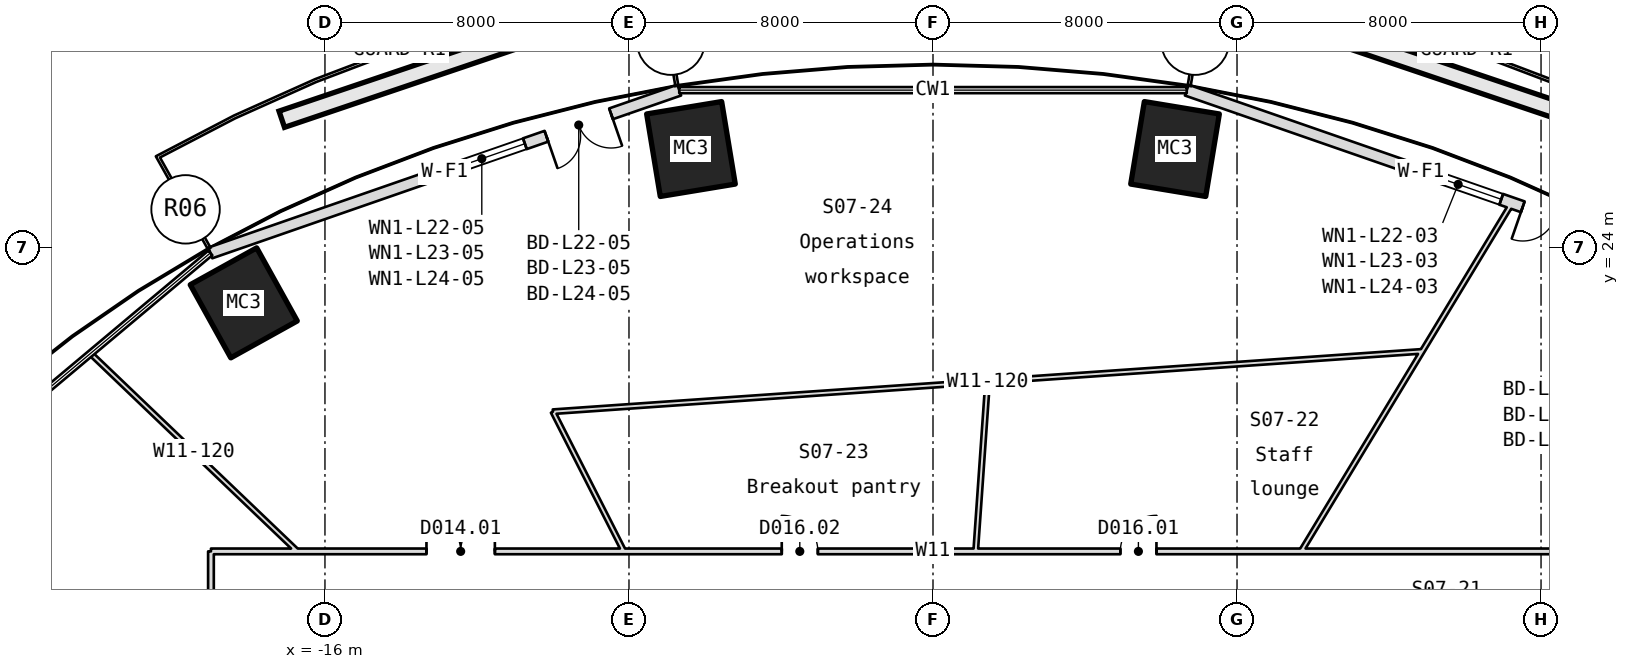
"""IFC4 building model, lengths in metres.
Left out: names, types, materials, properties, quantities, classifications, styles, units other than length and angle.
Written with IfcOpenShell. Run it as: python <this file> out.ifc"""

import sys

from ifc_helpers import new_model, si_unit, direction, frame, frame_2d, origin, origin_2d, place, context, subcontext, project, spatial, rectangle, hollow_rectangle, extrude, element, fill, save


model = new_model("IFC4")
c1 = context("Model", 3, precision=1e-05, world=origin(), true_north=direction((0.0, 1.0)))
c2 = subcontext(c1, "Body", "Model", "MODEL_VIEW")
j1 = project(units=[si_unit("LENGTHUNIT", "METRE"), si_unit("PLANEANGLEUNIT", "RADIAN")], contexts=[c1])
p1 = place(None, origin())
s1 = spatial("IfcSite", under=j1, at=p1, CompositionType="ELEMENT")
p2 = place(p1, origin())
s2 = spatial("IfcBuilding", under=s1, at=p2, CompositionType="ELEMENT")
p3 = place(p2, frame((0.0, 0.0, 107.7)))
s3 = spatial("IfcBuildingStorey", under=s2, at=p3, CompositionType="ELEMENT", Elevation=107.7)
for number, where, z_axis, x_axis in (
    (1, (6.369, 26.587, -0.18), (0.0, 0.0, 1.0), (0.987, -0.163, 0.0)),
    (2, (-6.369, 26.587, -0.18), (0.0, 0.0, 1.0), (0.987, 0.163, 0.0)),
    (3, (-18.137, 22.54, -0.18), (0.0, 0.0, 1.0), (0.874, 0.485, 0.0)),
):
    element("IfcColumn", number, at=place(p3, frame(where, z_axis=z_axis, x_axis=x_axis)), inside=s3, PredefinedType="COLUMN", context=c2, shape_type="SweptSolid", body=[
        extrude(hollow_rectangle(XDim=2.0, YDim=2.2, WallThickness=0.08, at=origin_2d()), origin(), (0.0, 0.0, 1.0), 4.15),
    ])
p4 = place(p3, frame((19.015, 23.853, 0.0), z_axis=(0.0, 0.0, 1.0), x_axis=(-0.944684524645, 0.327980409318, 0.0)))
e4 = element("IfcWall", 4, at=p4, inside=s3, PredefinedType="SOLIDWALL", context=c2, shape_type="SweptSolid", body=[
    extrude(rectangle(XDim=13.06, YDim=0.3, at=frame_2d((6.53, 0.0))), origin(), (0.0, 0.0, 1.0), 3.97),
])
p5 = place(p4, frame((1.9, 0.0, 0.0)))
e5 = element("IfcOpeningElement", 5, at=p5, cuts=e4, PredefinedType="OPENING", context=c2, shape_type="SweptSolid", body=[
    extrude(rectangle(XDim=1.8, YDim=2.4, at=frame_2d((0.9, 1.2))), frame((0.0, 0.16, 0.0), z_axis=(0.0, -1.0, 0.0), x_axis=(1.0, 0.0, 0.0)), (0.0, 0.0, 1.0), 0.32),
])
p6 = place(p4, frame((4.3, 0.0, 0.9)))
e6 = element("IfcOpeningElement", 6, at=p6, cuts=e4, PredefinedType="OPENING", context=c2, shape_type="SweptSolid", body=[
    extrude(rectangle(XDim=2.4, YDim=1.5, at=frame_2d((1.2, 0.75))), frame((0.0, 0.16, 0.0), z_axis=(0.0, -1.0, 0.0), x_axis=(1.0, 0.0, 0.0)), (0.0, 0.0, 1.0), 0.32),
])
p7 = place(p3, frame((-6.677, 28.137, 0.0), z_axis=(0.0, 0.0, 1.0), x_axis=(-0.944684524645, -0.327980409318, 0.0)))
e7 = element("IfcWall", 7, at=p7, inside=s3, PredefinedType="SOLIDWALL", context=c2, shape_type="SweptSolid", body=[
    extrude(rectangle(XDim=13.06, YDim=0.3, at=frame_2d((6.53, 0.0))), origin(), (0.0, 0.0, 1.0), 3.97),
])
p8 = place(p7, frame((1.9, 0.0, 0.0)))
e8 = element("IfcOpeningElement", 8, at=p8, cuts=e7, PredefinedType="OPENING", context=c2, shape_type="SweptSolid", body=[
    extrude(rectangle(XDim=1.8, YDim=2.4, at=frame_2d((0.9, 1.2))), frame((0.0, 0.16, 0.0), z_axis=(0.0, -1.0, 0.0), x_axis=(1.0, 0.0, 0.0)), (0.0, 0.0, 1.0), 0.32),
])
p9 = place(p7, frame((4.3, 0.0, 0.9)))
e9 = element("IfcOpeningElement", 9, at=p9, cuts=e7, PredefinedType="OPENING", context=c2, shape_type="SweptSolid", body=[
    extrude(rectangle(XDim=2.4, YDim=1.5, at=frame_2d((1.2, 0.75))), frame((0.0, 0.16, 0.0), z_axis=(0.0, -1.0, 0.0), x_axis=(1.0, 0.0, 0.0)), (0.0, 0.0, 1.0), 0.32),
])
p10 = place(p3, frame((-19.0, -16.0, 0.0), z_axis=(0.0, 0.0, 1.0), x_axis=(0.0, 1.0, 0.0)))
e10 = element("IfcWall", 10, at=p10, inside=s3, PredefinedType="PARTITIONING", context=c2, shape_type="SweptSolid", body=[
    extrude(rectangle(XDim=32.0, YDim=0.15, at=frame_2d((16.0, 0.0))), origin(), (0.0, 0.0, 1.0), 3.97),
])
p11 = place(p10, frame((15.1, 0.0, 0.0)))
e11 = element("IfcOpeningElement", 11, at=p11, cuts=e10, PredefinedType="OPENING", context=c2, shape_type="SweptSolid", body=[
    extrude(rectangle(XDim=1.8, YDim=2.1, at=frame_2d((0.9, 1.05))), frame((0.0, 0.085, 0.0), z_axis=(0.0, -1.0, 0.0), x_axis=(1.0, 0.0, 0.0)), (0.0, 0.0, 1.0), 0.17),
])
p12 = place(p3, frame((-19.0, 16.0, 0.0), z_axis=(0.0, 0.0, 1.0), x_axis=(1.0, 0.0, 0.0)))
e12 = element("IfcWall", 12, at=p12, inside=s3, PredefinedType="PARTITIONING", context=c2, shape_type="SweptSolid", body=[
    extrude(rectangle(XDim=38.0, YDim=0.15, at=frame_2d((19.0, 0.0))), origin(), (0.0, 0.0, 1.0), 3.97),
])
p13 = place(p12, frame((23.93, 0.0, 0.0)))
e13 = element("IfcOpeningElement", 13, at=p13, cuts=e12, PredefinedType="OPENING", context=c2, shape_type="SweptSolid", body=[
    extrude(rectangle(XDim=0.95, YDim=2.1, at=frame_2d((0.475, 1.05))), frame((0.0, 0.085, 0.0), z_axis=(0.0, -1.0, 0.0), x_axis=(1.0, 0.0, 0.0)), (0.0, 0.0, 1.0), 0.17),
])
p14 = place(p12, frame((15.02, 0.0, 0.0)))
e14 = element("IfcOpeningElement", 14, at=p14, cuts=e12, PredefinedType="OPENING", context=c2, shape_type="SweptSolid", body=[
    extrude(rectangle(XDim=0.95, YDim=2.1, at=frame_2d((0.475, 1.05))), frame((0.0, 0.085, 0.0), z_axis=(0.0, -1.0, 0.0), x_axis=(1.0, 0.0, 0.0)), (0.0, 0.0, 1.0), 0.17),
])
p15 = place(p12, frame((5.671, 0.0, 0.0)))
e15 = element("IfcOpeningElement", 15, at=p15, cuts=e12, PredefinedType="OPENING", context=c2, shape_type="SweptSolid", body=[
    extrude(rectangle(XDim=1.8, YDim=2.1, at=frame_2d((0.9, 1.05))), frame((0.0, 0.085, 0.0), z_axis=(0.0, -1.0, 0.0), x_axis=(1.0, 0.0, 0.0)), (0.0, 0.0, 1.0), 0.17),
])
p16 = place(p3, frame((-16.726, 16.0, 0.0), z_axis=(0.0, 0.0, 1.0), x_axis=(-0.722599633889, 0.691266785767, 0.0)))
e16 = element("IfcWall", 16, at=p16, inside=s3, PredefinedType="PARTITIONING", context=c2, shape_type="SweptSolid", body=[
    extrude(rectangle(XDim=7.535, YDim=0.12, at=frame_2d((3.767, 0.0))), origin(), (0.0, 0.0, 1.0), 3.97),
])
p17 = place(p3, frame((-10.001, 19.675, 0.0), z_axis=(0.0, 0.0, 1.0), x_axis=(0.45312545454, -0.891446758056, 0.0)))
e17 = element("IfcWall", 17, at=p17, inside=s3, PredefinedType="PARTITIONING", context=c2, shape_type="SweptSolid", body=[
    extrude(rectangle(XDim=4.123, YDim=0.12, at=frame_2d((2.062, 0.0))), origin(), (0.0, 0.0, 1.0), 3.97),
])
p18 = place(p3, frame((1.436, 20.469, 0.0), z_axis=(0.0, 0.0, 1.0), x_axis=(-0.069965230182, -0.997549430638, 0.0)))
e18 = element("IfcWall", 18, at=p18, inside=s3, PredefinedType="PARTITIONING", context=c2, shape_type="SweptSolid", body=[
    extrude(rectangle(XDim=4.48, YDim=0.12, at=frame_2d((2.24, 0.0))), origin(), (0.0, 0.0, 1.0), 3.97),
])
p19 = place(p3, frame((9.687, 16.0, 0.0), z_axis=(0.0, 0.0, 1.0), x_axis=(0.517899667471, 0.855441368203, 0.0)))
e19 = element("IfcWall", 19, at=p19, inside=s3, PredefinedType="PARTITIONING", context=c2, shape_type="SweptSolid", body=[
    extrude(rectangle(XDim=10.714, YDim=0.12, at=frame_2d((5.357, 0.0))), origin(), (0.0, 0.0, 1.0), 3.97),
])
p20 = place(p3, frame((12.874, 21.264, 0.0), z_axis=(0.0, 0.0, 1.0), x_axis=(-0.99759796259, -0.069269798869, 0.0)))
e20 = element("IfcWall", 20, at=p20, inside=s3, PredefinedType="PARTITIONING", context=c2, shape_type="SweptSolid", body=[
    extrude(rectangle(XDim=22.93, YDim=0.12, at=frame_2d((11.465, 0.0))), origin(), (0.0, 0.0, 1.0), 3.97),
])
p21 = place(p5, origin())
e21 = element("IfcDoor", 21, at=p21, inside=s3, OperationType="SINGLE_SWING_LEFT", PredefinedType="DOOR", context=c2, shape_type="SweptSolid", body=[
    extrude(rectangle(XDim=1.8, YDim=2.4, at=frame_2d((0.9, 1.2))), frame((0.0, 0.025, 0.0), z_axis=(0.0, -1.0, 0.0), x_axis=(1.0, 0.0, 0.0)), (0.0, 0.0, 1.0), 0.05),
])
fill(e5, e21)
p22 = place(p6, origin())
e22 = element("IfcWindow", 22, at=p22, inside=s3, PartitioningType="SINGLE_PANEL", PredefinedType="WINDOW", context=c2, shape_type="SweptSolid", body=[
    extrude(rectangle(XDim=2.4, YDim=1.5, at=frame_2d((1.2, 0.75))), frame((0.0, 0.03, 0.0), z_axis=(0.0, -1.0, 0.0), x_axis=(1.0, 0.0, 0.0)), (0.0, 0.0, 1.0), 0.06),
])
fill(e6, e22)
p23 = place(p8, origin())
e23 = element("IfcDoor", 23, at=p23, inside=s3, OperationType="SINGLE_SWING_LEFT", PredefinedType="DOOR", context=c2, shape_type="SweptSolid", body=[
    extrude(rectangle(XDim=1.8, YDim=2.4, at=frame_2d((0.9, 1.2))), frame((0.0, 0.025, 0.0), z_axis=(0.0, -1.0, 0.0), x_axis=(1.0, 0.0, 0.0)), (0.0, 0.0, 1.0), 0.05),
])
fill(e8, e23)
p24 = place(p9, origin())
e24 = element("IfcWindow", 24, at=p24, inside=s3, PartitioningType="SINGLE_PANEL", PredefinedType="WINDOW", context=c2, shape_type="SweptSolid", body=[
    extrude(rectangle(XDim=2.4, YDim=1.5, at=frame_2d((1.2, 0.75))), frame((0.0, 0.03, 0.0), z_axis=(0.0, -1.0, 0.0), x_axis=(1.0, 0.0, 0.0)), (0.0, 0.0, 1.0), 0.06),
])
fill(e9, e24)
p25 = place(p13, origin())
e25 = element("IfcDoor", 25, at=p25, inside=s3, OperationType="SINGLE_SWING_RIGHT", PredefinedType="DOOR", context=c2, shape_type="SweptSolid", body=[
    extrude(rectangle(XDim=0.95, YDim=2.1, at=frame_2d((0.475, 1.05))), frame((0.0, 0.025, 0.0), z_axis=(0.0, -1.0, 0.0), x_axis=(1.0, 0.0, 0.0)), (0.0, 0.0, 1.0), 0.05),
])
fill(e13, e25)
p26 = place(p14, origin())
e26 = element("IfcDoor", 26, at=p26, inside=s3, OperationType="SINGLE_SWING_RIGHT", PredefinedType="DOOR", context=c2, shape_type="SweptSolid", body=[
    extrude(rectangle(XDim=0.95, YDim=2.1, at=frame_2d((0.475, 1.05))), frame((0.0, 0.025, 0.0), z_axis=(0.0, -1.0, 0.0), x_axis=(1.0, 0.0, 0.0)), (0.0, 0.0, 1.0), 0.05),
])
fill(e14, e26)
p27 = place(p15, origin())
e27 = element("IfcDoor", 27, at=p27, inside=s3, OperationType="DOUBLE_DOOR_SINGLE_SWING", PredefinedType="DOOR", context=c2, shape_type="SweptSolid", body=[
    extrude(rectangle(XDim=1.8, YDim=2.1, at=frame_2d((0.9, 1.05))), frame((0.0, 0.025, 0.0), z_axis=(0.0, -1.0, 0.0), x_axis=(1.0, 0.0, 0.0)), (0.0, 0.0, 1.0), 0.05),
])
fill(e15, e27)
save(model, sys.argv[1])
